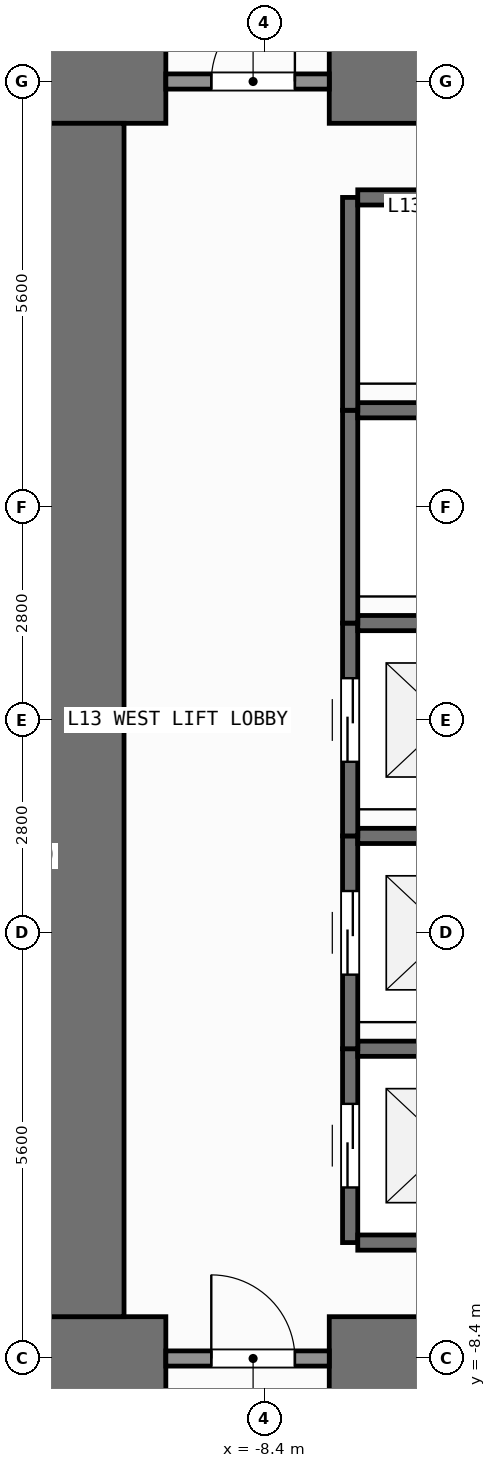
"""IFC4 building model, lengths in metres.
Left out: names, types, materials, properties, quantities, classifications, styles, units other than length and angle.
Written with IfcOpenShell. Run it as: python <this file> out.ifc"""

import sys

from ifc_helpers import new_model, si_unit, direction, frame, frame_2d, origin, place, context, subcontext, project, spatial, rectangle, extrude, element, fill, save


model = new_model("IFC4")
c1 = context("Model", 3, precision=1e-05, world=origin(), true_north=direction((0.0, 1.0)))
c2 = subcontext(c1, "Body", "Model", "MODEL_VIEW")
j1 = project(units=[si_unit("LENGTHUNIT", "METRE"), si_unit("PLANEANGLEUNIT", "RADIAN")], contexts=[c1])
p1 = place(None, origin())
s1 = spatial("IfcSite", under=j1, at=p1, CompositionType="ELEMENT")
p2 = place(p1, origin())
s2 = spatial("IfcBuilding", under=s1, at=p2, CompositionType="ELEMENT")
p3 = place(p2, frame((0.0, 0.0, 50.1)))
s3 = spatial("IfcBuildingStorey", under=s2, at=p3, CompositionType="ELEMENT", Elevation=50.1)
p4 = place(p3, frame((-11.35, -8.4, 0.0), z_axis=(0.0, 0.0, 1.0), x_axis=(1.0, 0.0, 0.0)))
e1 = element("IfcWall", 1, at=p4, inside=s3, PredefinedType="SHEAR", context=c2, shape_type="SweptSolid", body=[
    extrude(rectangle(XDim=1.65, YDim=1.1, at=frame_2d((0.825, 0.0))), origin(), (0.0, 0.0, 1.0), 3.9),
])
p5 = place(p3, frame((-7.55, -8.4, 0.0), z_axis=(0.0, 0.0, 1.0), x_axis=(1.0, 0.0, 0.0)))
e2 = element("IfcWall", 2, at=p5, inside=s3, PredefinedType="SHEAR", context=c2, shape_type="SweptSolid", body=[
    extrude(rectangle(XDim=3.35, YDim=1.1, at=frame_2d((1.675, 0.0))), origin(), (0.0, 0.0, 1.0), 3.9),
])
p6 = place(p3, frame((-11.35, 8.4, 0.0), z_axis=(0.0, 0.0, 1.0), x_axis=(1.0, 0.0, 0.0)))
e3 = element("IfcWall", 3, at=p6, inside=s3, PredefinedType="SHEAR", context=c2, shape_type="SweptSolid", body=[
    extrude(rectangle(XDim=1.65, YDim=1.1, at=frame_2d((0.825, 0.0))), origin(), (0.0, 0.0, 1.0), 3.9),
])
p7 = place(p3, frame((-7.55, 8.4, 0.0), z_axis=(0.0, 0.0, 1.0), x_axis=(1.0, 0.0, 0.0)))
e4 = element("IfcWall", 4, at=p7, inside=s3, PredefinedType="SHEAR", context=c2, shape_type="SweptSolid", body=[
    extrude(rectangle(XDim=16.5, YDim=1.1, at=frame_2d((8.25, 0.0))), origin(), (0.0, 0.0, 1.0), 3.9),
])
p8 = place(p3, frame((-10.8, -7.85, 0.0), z_axis=(0.0, 0.0, 1.0), x_axis=(0.0, 1.0, 0.0)))
e5 = element("IfcWall", 5, at=p8, inside=s3, PredefinedType="SHEAR", context=c2, shape_type="SweptSolid", body=[
    extrude(rectangle(XDim=15.7, YDim=1.1, at=frame_2d((7.85, 0.0))), origin(), (0.0, 0.0, 1.0), 3.9),
])
p9 = place(p3, frame((-7.275, -6.875, 0.0), z_axis=(0.0, 0.0, 1.0), x_axis=(0.0, 1.0, 0.0)))
e6 = element("IfcWall", 6, at=p9, inside=s3, PredefinedType="SHEAR", context=c2, shape_type="SweptSolid", body=[
    extrude(rectangle(XDim=2.55, YDim=0.2, at=frame_2d((1.275, 0.0))), origin(), (0.0, 0.0, 1.0), 3.62),
])
p10 = place(p9, frame((0.725, 0.0, 0.0)))
e7 = element("IfcOpeningElement", 7, at=p10, cuts=e6, PredefinedType="OPENING", context=c2, shape_type="SweptSolid", body=[
    extrude(rectangle(XDim=1.1, YDim=2.2, at=frame_2d((0.55, 1.1))), frame((0.0, 0.11, 0.0), z_axis=(0.0, -1.0, 0.0), x_axis=(1.0, 0.0, 0.0)), (0.0, 0.0, 1.0), 0.22),
])
for number, where, z_axis, x_axis in (
    (8, (-7.175, -6.875, 0.0), (0.0, 0.0, 1.0), (1.0, 0.0, 0.0)),
    (9, (-7.175, -4.325, 0.0), (0.0, 0.0, 1.0), (1.0, 0.0, 0.0)),
):
    element("IfcWall", number, at=place(p3, frame(where, z_axis=z_axis, x_axis=x_axis)), inside=s3, PredefinedType="SHEAR", context=c2, shape_type="SweptSolid", body=[
        extrude(rectangle(XDim=2.35, YDim=0.2, at=frame_2d((1.175, 0.0))), origin(), (0.0, 0.0, 1.0), 3.62),
    ])
p11 = place(p3, frame((-7.275, -4.325, 0.0), z_axis=(0.0, 0.0, 1.0), x_axis=(0.0, 1.0, 0.0)))
e10 = element("IfcWall", 10, at=p11, inside=s3, PredefinedType="SHEAR", context=c2, shape_type="SweptSolid", body=[
    extrude(rectangle(XDim=2.8, YDim=0.2, at=frame_2d((1.4, 0.0))), origin(), (0.0, 0.0, 1.0), 3.62),
])
p12 = place(p11, frame((0.975, 0.0, 0.0)))
e11 = element("IfcOpeningElement", 11, at=p12, cuts=e10, PredefinedType="OPENING", context=c2, shape_type="SweptSolid", body=[
    extrude(rectangle(XDim=1.1, YDim=2.2, at=frame_2d((0.55, 1.1))), frame((0.0, 0.11, 0.0), z_axis=(0.0, -1.0, 0.0), x_axis=(1.0, 0.0, 0.0)), (0.0, 0.0, 1.0), 0.22),
])
p13 = place(p3, frame((-7.175, -1.525, 0.0), z_axis=(0.0, 0.0, 1.0), x_axis=(1.0, 0.0, 0.0)))
e12 = element("IfcWall", 12, at=p13, inside=s3, PredefinedType="SHEAR", context=c2, shape_type="SweptSolid", body=[
    extrude(rectangle(XDim=2.35, YDim=0.2, at=frame_2d((1.175, 0.0))), origin(), (0.0, 0.0, 1.0), 3.62),
])
p14 = place(p3, frame((-7.275, -1.525, 0.0), z_axis=(0.0, 0.0, 1.0), x_axis=(0.0, 1.0, 0.0)))
e13 = element("IfcWall", 13, at=p14, inside=s3, PredefinedType="SHEAR", context=c2, shape_type="SweptSolid", body=[
    extrude(rectangle(XDim=2.8, YDim=0.2, at=frame_2d((1.4, 0.0))), origin(), (0.0, 0.0, 1.0), 3.62),
])
p15 = place(p14, frame((0.975, 0.0, 0.0)))
e14 = element("IfcOpeningElement", 14, at=p15, cuts=e13, PredefinedType="OPENING", context=c2, shape_type="SweptSolid", body=[
    extrude(rectangle(XDim=1.1, YDim=2.2, at=frame_2d((0.55, 1.1))), frame((0.0, 0.11, 0.0), z_axis=(0.0, -1.0, 0.0), x_axis=(1.0, 0.0, 0.0)), (0.0, 0.0, 1.0), 0.22),
])
p16 = place(p3, frame((-7.175, 1.275, 0.0), z_axis=(0.0, 0.0, 1.0), x_axis=(1.0, 0.0, 0.0)))
e15 = element("IfcWall", 15, at=p16, inside=s3, PredefinedType="SHEAR", context=c2, shape_type="SweptSolid", body=[
    extrude(rectangle(XDim=2.35, YDim=0.2, at=frame_2d((1.175, 0.0))), origin(), (0.0, 0.0, 1.0), 3.62),
])
p17 = place(p3, frame((-7.275, 1.275, 0.0), z_axis=(0.0, 0.0, 1.0), x_axis=(0.0, 1.0, 0.0)))
e16 = element("IfcWall", 16, at=p17, inside=s3, PredefinedType="SHEAR", context=c2, shape_type="SweptSolid", body=[
    extrude(rectangle(XDim=2.8, YDim=0.2, at=frame_2d((1.4, 0.0))), origin(), (0.0, 0.0, 1.0), 3.62),
])
p18 = place(p3, frame((-7.175, 4.075, 0.0), z_axis=(0.0, 0.0, 1.0), x_axis=(1.0, 0.0, 0.0)))
e17 = element("IfcWall", 17, at=p18, inside=s3, PredefinedType="SHEAR", context=c2, shape_type="SweptSolid", body=[
    extrude(rectangle(XDim=2.35, YDim=0.2, at=frame_2d((1.175, 0.0))), origin(), (0.0, 0.0, 1.0), 3.62),
])
p19 = place(p3, frame((-7.275, 4.075, 0.0), z_axis=(0.0, 0.0, 1.0), x_axis=(0.0, 1.0, 0.0)))
e18 = element("IfcWall", 18, at=p19, inside=s3, PredefinedType="SHEAR", context=c2, shape_type="SweptSolid", body=[
    extrude(rectangle(XDim=2.8, YDim=0.2, at=frame_2d((1.4, 0.0))), origin(), (0.0, 0.0, 1.0), 3.62),
])
p20 = place(p3, frame((-7.175, 6.875, 0.0), z_axis=(0.0, 0.0, 1.0), x_axis=(1.0, 0.0, 0.0)))
e19 = element("IfcWall", 19, at=p20, inside=s3, PredefinedType="SHEAR", context=c2, shape_type="SweptSolid", body=[
    extrude(rectangle(XDim=2.35, YDim=0.2, at=frame_2d((1.175, 0.0))), origin(), (0.0, 0.0, 1.0), 3.62),
])
p21 = place(p3, frame((-9.7, -8.4, 0.0), z_axis=(0.0, 0.0, 1.0), x_axis=(1.0, 0.0, 0.0)))
e20 = element("IfcWall", 20, at=p21, inside=s3, PredefinedType="SOLIDWALL", context=c2, shape_type="SweptSolid", body=[
    extrude(rectangle(XDim=2.15, YDim=0.2, at=frame_2d((1.075, 0.0))), origin(), (0.0, 0.0, 1.0), 2.66),
])
p22 = place(p21, frame((0.598, 0.0, 0.0)))
e21 = element("IfcOpeningElement", 21, at=p22, cuts=e20, PredefinedType="OPENING", context=c2, shape_type="SweptSolid", body=[
    extrude(rectangle(XDim=1.1, YDim=2.15, at=frame_2d((0.55, 1.075))), frame((0.0, 0.11, 0.0), z_axis=(0.0, -1.0, 0.0), x_axis=(1.0, 0.0, 0.0)), (0.0, 0.0, 1.0), 0.22),
])
p23 = place(p3, frame((-9.7, 8.4, 0.0), z_axis=(0.0, 0.0, 1.0), x_axis=(1.0, 0.0, 0.0)))
e22 = element("IfcWall", 22, at=p23, inside=s3, PredefinedType="SOLIDWALL", context=c2, shape_type="SweptSolid", body=[
    extrude(rectangle(XDim=2.15, YDim=0.2, at=frame_2d((1.075, 0.0))), origin(), (0.0, 0.0, 1.0), 2.66),
])
p24 = place(p23, frame((0.598, 0.0, 0.0)))
e23 = element("IfcOpeningElement", 23, at=p24, cuts=e22, PredefinedType="OPENING", context=c2, shape_type="SweptSolid", body=[
    extrude(rectangle(XDim=1.1, YDim=2.15, at=frame_2d((0.55, 1.075))), frame((0.0, 0.11, 0.0), z_axis=(0.0, -1.0, 0.0), x_axis=(1.0, 0.0, 0.0)), (0.0, 0.0, 1.0), 0.22),
])
p25 = place(p10, origin())
e24 = element("IfcDoor", 24, at=p25, inside=s3, OperationType="SLIDING_TO_LEFT", PredefinedType="DOOR", context=c2, shape_type="SweptSolid", body=[
    extrude(rectangle(XDim=1.1, YDim=2.2, at=frame_2d((0.55, 1.1))), frame((0.0, 0.025, 0.0), z_axis=(0.0, -1.0, 0.0), x_axis=(1.0, 0.0, 0.0)), (0.0, 0.0, 1.0), 0.05),
])
fill(e7, e24)
p26 = place(p12, origin())
e25 = element("IfcDoor", 25, at=p26, inside=s3, OperationType="SLIDING_TO_LEFT", PredefinedType="DOOR", context=c2, shape_type="SweptSolid", body=[
    extrude(rectangle(XDim=1.1, YDim=2.2, at=frame_2d((0.55, 1.1))), frame((0.0, 0.025, 0.0), z_axis=(0.0, -1.0, 0.0), x_axis=(1.0, 0.0, 0.0)), (0.0, 0.0, 1.0), 0.05),
])
fill(e11, e25)
p27 = place(p15, origin())
e26 = element("IfcDoor", 26, at=p27, inside=s3, OperationType="SLIDING_TO_LEFT", PredefinedType="DOOR", context=c2, shape_type="SweptSolid", body=[
    extrude(rectangle(XDim=1.1, YDim=2.2, at=frame_2d((0.55, 1.1))), frame((0.0, 0.025, 0.0), z_axis=(0.0, -1.0, 0.0), x_axis=(1.0, 0.0, 0.0)), (0.0, 0.0, 1.0), 0.05),
])
fill(e14, e26)
p28 = place(p22, origin())
e27 = element("IfcDoor", 27, at=p28, inside=s3, OperationType="SINGLE_SWING_LEFT", PredefinedType="DOOR", context=c2, shape_type="SweptSolid", body=[
    extrude(rectangle(XDim=1.1, YDim=2.15, at=frame_2d((0.55, 1.075))), frame((0.0, 0.025, 0.0), z_axis=(0.0, -1.0, 0.0), x_axis=(1.0, 0.0, 0.0)), (0.0, 0.0, 1.0), 0.05),
])
fill(e21, e27)
p29 = place(p24, origin())
e28 = element("IfcDoor", 28, at=p29, inside=s3, OperationType="SINGLE_SWING_RIGHT", PredefinedType="DOOR", context=c2, shape_type="SweptSolid", body=[
    extrude(rectangle(XDim=1.1, YDim=2.15, at=frame_2d((0.55, 1.075))), frame((0.0, 0.025, 0.0), z_axis=(0.0, -1.0, 0.0), x_axis=(1.0, 0.0, 0.0)), (0.0, 0.0, 1.0), 0.05),
])
fill(e23, e28)
save(model, sys.argv[1])
